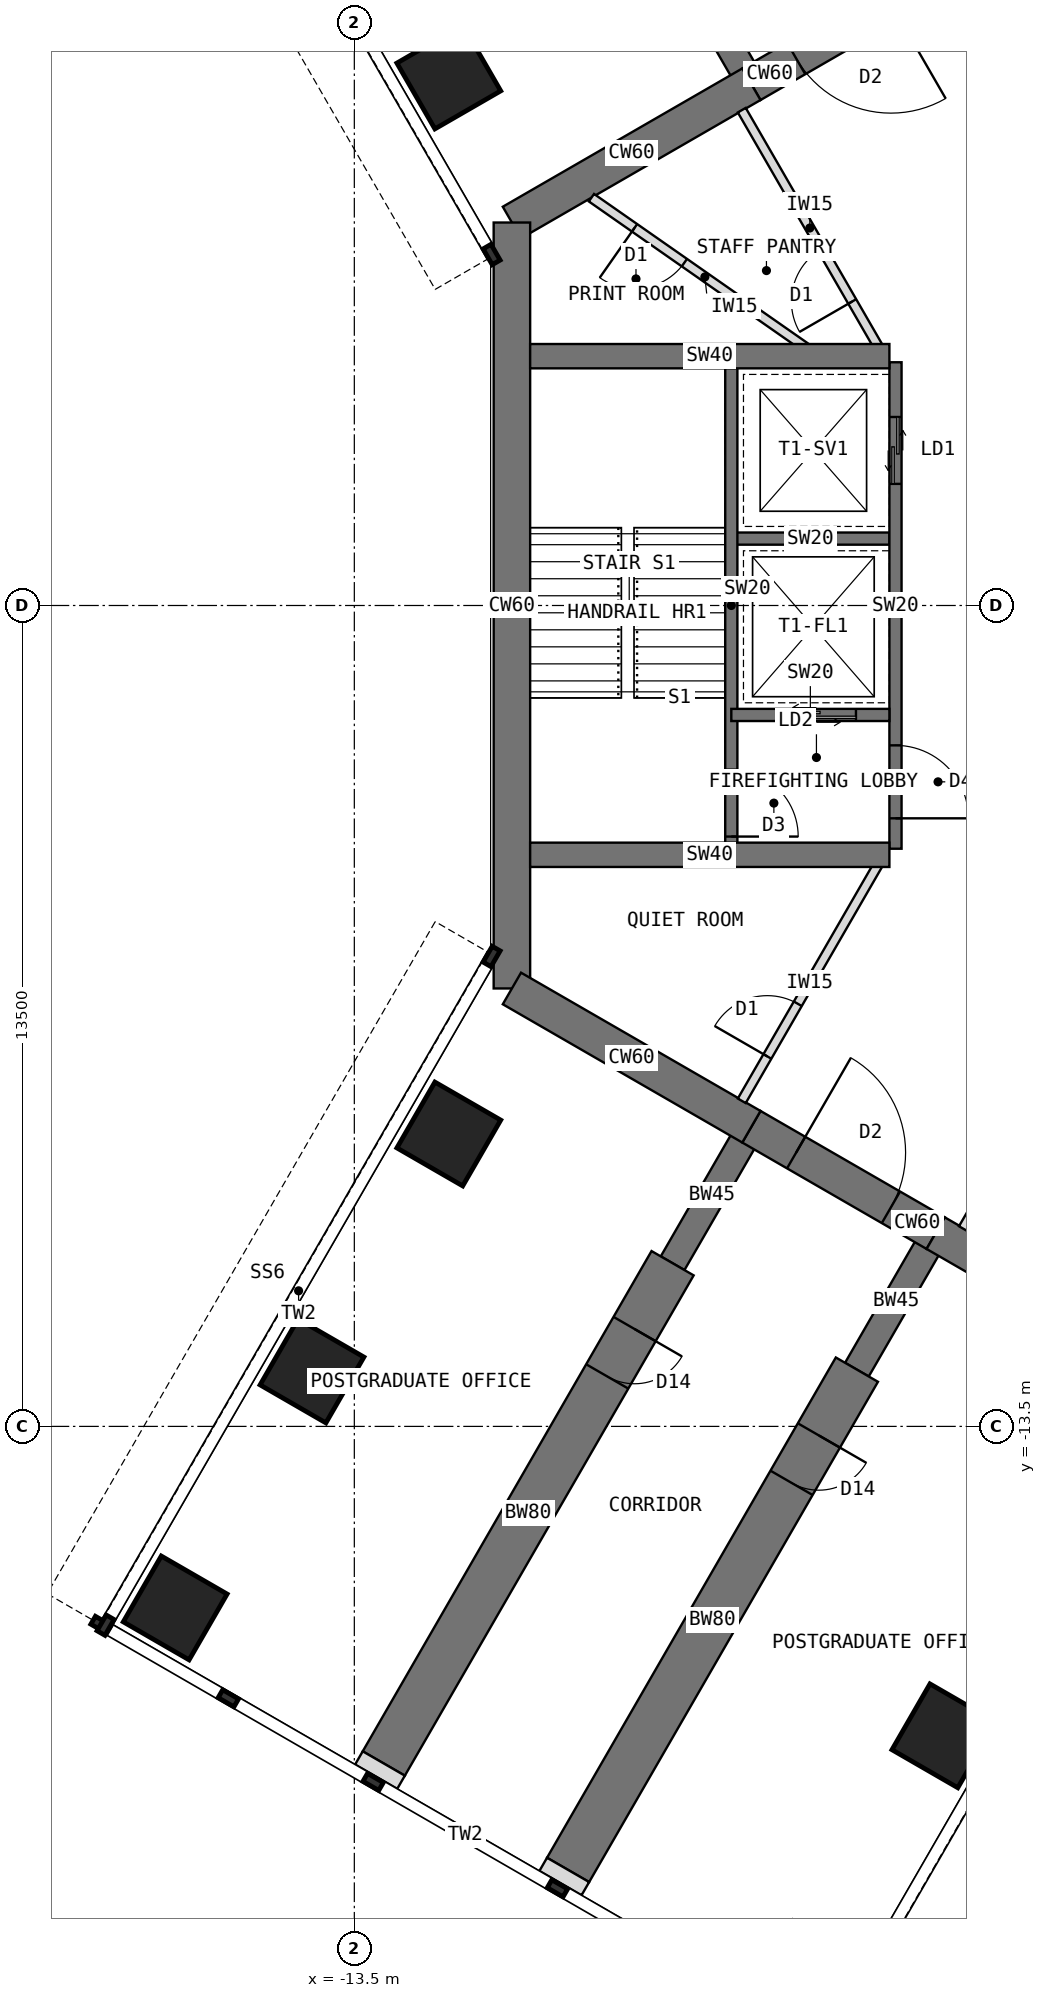
"""IFC4 building model, lengths in metres.
Left out: names, types, materials, properties, quantities, classifications, styles, units other than length and angle.
Written with IfcOpenShell. Run it as: python <this file> out.ifc"""

import sys

from ifc_helpers import new_model, si_unit, direction, frame, frame_2d, origin, origin_2d, place, context, subcontext, project, spatial, rectangle, extrude, element, fill, save


model = new_model("IFC4")
c1 = context("Model", 3, precision=1e-05, world=origin(), true_north=direction((0.0, 1.0)))
c2 = subcontext(c1, "Body", "Model", "MODEL_VIEW")
j1 = project(units=[si_unit("LENGTHUNIT", "METRE"), si_unit("PLANEANGLEUNIT", "RADIAN")], contexts=[c1])
p1 = place(None, origin())
s1 = spatial("IfcSite", under=j1, at=p1, CompositionType="ELEMENT")
p2 = place(p1, origin())
s2 = spatial("IfcBuilding", under=s1, at=p2, CompositionType="ELEMENT")
p3 = place(p2, frame((0.0, 0.0, 157.5)))
s3 = spatial("IfcBuildingStorey", under=s2, at=p3, CompositionType="ELEMENT", Elevation=157.5)
p4 = place(p3, frame((-3.939, 10.322, 0.0), z_axis=(0.0, 0.0, 1.0), x_axis=(-0.866019471182, -0.500010275428, 0.0)))
e1 = element("IfcWall", 1, at=p4, inside=s3, PredefinedType="SHEAR", context=c2, shape_type="SweptSolid", body=[
    extrude(rectangle(XDim=3.5, YDim=0.6, at=frame_2d((1.75, 0.0))), origin(), (0.0, 0.0, 1.0), 4.0),
])
p5 = place(p4, frame((0.85, 0.0, 0.0)))
e2 = element("IfcOpeningElement", 2, at=p5, cuts=e1, PredefinedType="OPENING", context=c2, shape_type="SweptSolid", body=[
    extrude(rectangle(XDim=1.8, YDim=2.1, at=frame_2d((0.9, 1.05))), frame((0.0, 0.31, 0.0), z_axis=(0.0, -1.0, 0.0), x_axis=(1.0, 0.0, 0.0)), (0.0, 0.0, 1.0), 0.62),
])
p6 = place(p3, frame((-6.97, 8.572, 0.0), z_axis=(0.0, 0.0, 1.0), x_axis=(-0.866034513004, -0.499984222037, 0.0)))
e3 = element("IfcWall", 3, at=p6, inside=s3, PredefinedType="SHEAR", context=c2, shape_type="SweptSolid", body=[
    extrude(rectangle(XDim=4.548, YDim=0.6, at=frame_2d((2.274, 0.0))), origin(), (0.0, 0.0, 1.0), 4.0),
])
p7 = place(p3, frame((-10.908, 6.298, 0.0), z_axis=(0.0, 0.0, 1.0), x_axis=(0.0, -1.0, 0.0)))
e4 = element("IfcWall", 4, at=p7, inside=s3, PredefinedType="SHEAR", context=c2, shape_type="SweptSolid", body=[
    extrude(rectangle(XDim=12.596, YDim=0.6, at=frame_2d((6.298, 0.0))), origin(), (0.0, 0.0, 1.0), 4.0),
])
p8 = place(p3, frame((-10.908, -6.298, 0.0), z_axis=(0.0, 0.0, 1.0), x_axis=(0.866034513004, -0.499984222037, 0.0)))
e5 = element("IfcWall", 5, at=p8, inside=s3, PredefinedType="SHEAR", context=c2, shape_type="SweptSolid", body=[
    extrude(rectangle(XDim=4.548, YDim=0.6, at=frame_2d((2.274, 0.0))), origin(), (0.0, 0.0, 1.0), 4.0),
])
p9 = place(p3, frame((-6.97, -8.572, 0.0), z_axis=(0.0, 0.0, 1.0), x_axis=(0.866019471182, -0.500010275428, 0.0)))
e6 = element("IfcWall", 6, at=p9, inside=s3, PredefinedType="SHEAR", context=c2, shape_type="SweptSolid", body=[
    extrude(rectangle(XDim=3.5, YDim=0.6, at=frame_2d((1.75, 0.0))), origin(), (0.0, 0.0, 1.0), 4.0),
])
p10 = place(p9, frame((0.85, 0.0, 0.0)))
e7 = element("IfcOpeningElement", 7, at=p10, cuts=e6, PredefinedType="OPENING", context=c2, shape_type="SweptSolid", body=[
    extrude(rectangle(XDim=1.8, YDim=2.1, at=frame_2d((0.9, 1.05))), frame((0.0, 0.31, 0.0), z_axis=(0.0, -1.0, 0.0), x_axis=(1.0, 0.0, 0.0)), (0.0, 0.0, 1.0), 0.62),
])
p11 = place(p3, frame((-3.939, -10.322, 0.0), z_axis=(0.0, 0.0, 1.0), x_axis=(0.866011268655, -0.500024481964, 0.0)))
e8 = element("IfcWall", 8, at=p11, inside=s3, PredefinedType="SHEAR", context=c2, shape_type="SweptSolid", body=[
    extrude(rectangle(XDim=4.548, YDim=0.6, at=frame_2d((2.274, 0.0))), origin(), (0.0, 0.0, 1.0), 4.0),
])
for number, where, z_axis, x_axis in (
    (9, (-6.97, 8.572, 0.0), (0.0, 0.0, 1.0), (-0.5, 0.866, 0.0)),
    (10, (-3.939, -10.322, 0.0), (0.0, 0.0, 1.0), (-0.5, -0.866, 0.0)),
):
    element("IfcWall", number, at=place(p3, frame(where, z_axis=z_axis, x_axis=x_axis)), inside=s3, PredefinedType="SHEAR", context=c2, shape_type="SweptSolid", body=[
        extrude(rectangle(XDim=2.592, YDim=0.45, at=frame_2d((1.296, 0.0))), origin(), (0.0, 0.0, 1.0), 4.0),
    ])
p12 = place(p3, frame((-5.234, -12.566, 0.0), z_axis=(0.0, 0.0, 1.0), x_axis=(-0.499997557548, -0.86602681393, 0.0)))
e11 = element("IfcWall", 11, at=p12, inside=s3, PredefinedType="SHEAR", context=c2, shape_type="SweptSolid", body=[
    extrude(rectangle(XDim=9.5, YDim=0.8, at=frame_2d((4.75, 0.0))), origin(), (0.0, 0.0, 1.0), 4.0),
])
p13 = place(p12, frame((1.25, 0.0, 0.0)))
e12 = element("IfcOpeningElement", 12, at=p13, cuts=e11, PredefinedType="OPENING", context=c2, shape_type="SweptSolid", body=[
    extrude(rectangle(XDim=0.9, YDim=2.1, at=frame_2d((0.45, 1.05))), frame((0.0, 0.41, 0.0), z_axis=(0.0, -1.0, 0.0), x_axis=(1.0, 0.0, 0.0)), (0.0, 0.0, 1.0), 0.82),
])
p14 = place(p3, frame((-6.97, -8.572, 0.0), z_axis=(0.0, 0.0, 1.0), x_axis=(-0.499988811324, -0.866031863473, 0.0)))
e13 = element("IfcWall", 13, at=p14, inside=s3, PredefinedType="SHEAR", context=c2, shape_type="SweptSolid", body=[
    extrude(rectangle(XDim=2.592, YDim=0.45, at=frame_2d((1.296, 0.0))), origin(), (0.0, 0.0, 1.0), 4.0),
])
p15 = place(p3, frame((-8.266, -10.816, 0.0), z_axis=(0.0, 0.0, 1.0), x_axis=(-0.499997557548, -0.86602681393, 0.0)))
e14 = element("IfcWall", 14, at=p15, inside=s3, PredefinedType="SHEAR", context=c2, shape_type="SweptSolid", body=[
    extrude(rectangle(XDim=9.5, YDim=0.8, at=frame_2d((4.75, 0.0))), origin(), (0.0, 0.0, 1.0), 4.0),
])
p16 = place(p15, frame((1.25, 0.0, 0.0)))
e15 = element("IfcOpeningElement", 15, at=p16, cuts=e14, PredefinedType="OPENING", context=c2, shape_type="SweptSolid", body=[
    extrude(rectangle(XDim=0.9, YDim=2.1, at=frame_2d((0.45, 1.05))), frame((0.0, 0.41, 0.0), z_axis=(0.0, -1.0, 0.0), x_axis=(1.0, 0.0, 0.0)), (0.0, 0.0, 1.0), 0.82),
])
for number, where, z_axis, x_axis in (
    (16, (-11.946, 8.691, 0.0), (0.0, 0.0, 1.0), (0.866, 0.5, 0.0)),
    (17, (-11.946, -8.691, 0.0), (0.0, 0.0, 1.0), (0.5, 0.866, 0.0)),
    (18, (-3.804, -18.588, 0.0), (0.0, 0.0, 1.0), (0.5, 0.866, 0.0)),
    (19, (-14.196, -12.588, 0.0), (0.0, 0.0, 1.0), (0.5, 0.866, 0.0)),
    (20, (-16.446, -16.486, 0.0), (0.0, 0.0, 1.0), (0.5, 0.866, 0.0)),
):
    element("IfcColumn", number, at=place(p3, frame(where, z_axis=z_axis, x_axis=x_axis)), inside=s3, PredefinedType="COLUMN", context=c2, shape_type="SweptSolid", body=[
        extrude(rectangle(XDim=1.25, YDim=1.25, at=origin_2d()), origin(), (0.0, 0.0, 1.0), 4.0),
    ])
for number, where, z_axis, x_axis in (
    (21, (-9.984, -20.794, 0.0), (0.0, 0.0, 1.0), (-0.5, -0.866, 0.0)),
    (22, (-13.016, -19.044, 0.0), (0.0, 0.0, 1.0), (-0.5, -0.866, 0.0)),
):
    element("IfcWall", number, at=place(p3, frame(where, z_axis=z_axis, x_axis=x_axis)), inside=s3, PredefinedType="PARTITIONING", context=c2, shape_type="SweptSolid", body=[
        extrude(rectangle(XDim=0.25, YDim=0.8, at=frame_2d((0.125, 0.0))), origin(), (0.0, 0.0, 1.0), 3.8),
    ])
p17 = place(p3, frame((-4.6, 4.0, 0.0), z_axis=(0.0, 0.0, 1.0), x_axis=(0.0, -1.0, 0.0)))
e23 = element("IfcWall", 23, at=p17, inside=s3, PredefinedType="SHEAR", context=c2, shape_type="SweptSolid", body=[
    extrude(rectangle(XDim=8.0, YDim=0.2, at=frame_2d((4.0, 0.0))), origin(), (0.0, 0.0, 1.0), 4.0),
])
p18 = place(p17, frame((6.3, 0.0, 0.0)))
e24 = element("IfcOpeningElement", 24, at=p18, cuts=e23, PredefinedType="OPENING", context=c2, shape_type="SweptSolid", body=[
    extrude(rectangle(XDim=1.2, YDim=2.1, at=frame_2d((0.6, 1.05))), frame((0.0, 0.11, 0.0), z_axis=(0.0, -1.0, 0.0), x_axis=(1.0, 0.0, 0.0)), (0.0, 0.0, 1.0), 0.22),
])
p19 = place(p17, frame((0.9, 0.0, 0.0)))
e25 = element("IfcOpeningElement", 25, at=p19, cuts=e23, PredefinedType="OPENING", context=c2, shape_type="SweptSolid", body=[
    extrude(rectangle(XDim=1.1, YDim=2.2, at=frame_2d((0.55, 1.1))), frame((0.0, 0.11, 0.0), z_axis=(0.0, -1.0, 0.0), x_axis=(1.0, 0.0, 0.0)), (0.0, 0.0, 1.0), 0.22),
])
p20 = place(p3, frame((-4.7, 1.1, 0.0), z_axis=(0.0, 0.0, 1.0), x_axis=(-1.0, 0.0, 0.0)))
e26 = element("IfcWall", 26, at=p20, inside=s3, PredefinedType="SHEAR", context=c2, shape_type="SweptSolid", body=[
    extrude(rectangle(XDim=2.6, YDim=0.2, at=frame_2d((1.3, 0.0))), origin(), (0.0, 0.0, 1.0), 4.0),
])
p21 = place(p3, frame((-4.7, -1.8, 0.0), z_axis=(0.0, 0.0, 1.0), x_axis=(-1.0, 0.0, 0.0)))
e27 = element("IfcWall", 27, at=p21, inside=s3, PredefinedType="SHEAR", context=c2, shape_type="SweptSolid", body=[
    extrude(rectangle(XDim=2.6, YDim=0.2, at=frame_2d((1.3, 0.0))), origin(), (0.0, 0.0, 1.0), 4.0),
])
p22 = place(p21, frame((0.55, 0.0, 0.0)))
e28 = element("IfcOpeningElement", 28, at=p22, cuts=e27, PredefinedType="OPENING", context=c2, shape_type="SweptSolid", body=[
    extrude(rectangle(XDim=1.3, YDim=2.2, at=frame_2d((0.65, 1.1))), frame((0.0, 0.11, 0.0), z_axis=(0.0, -1.0, 0.0), x_axis=(1.0, 0.0, 0.0)), (0.0, 0.0, 1.0), 0.22),
])
p23 = place(p3, frame((-7.3, 4.0, 0.0), z_axis=(0.0, 0.0, 1.0), x_axis=(0.0, -1.0, 0.0)))
e29 = element("IfcWall", 29, at=p23, inside=s3, PredefinedType="SHEAR", context=c2, shape_type="SweptSolid", body=[
    extrude(rectangle(XDim=8.0, YDim=0.2, at=frame_2d((4.0, 0.0))), origin(), (0.0, 0.0, 1.0), 4.0),
])
p24 = place(p23, frame((6.7, 0.0, 0.0)))
e30 = element("IfcOpeningElement", 30, at=p24, cuts=e29, PredefinedType="OPENING", context=c2, shape_type="SweptSolid", body=[
    extrude(rectangle(XDim=1.1, YDim=2.1, at=frame_2d((0.55, 1.05))), frame((0.0, 0.11, 0.0), z_axis=(0.0, -1.0, 0.0), x_axis=(1.0, 0.0, 0.0)), (0.0, 0.0, 1.0), 0.22),
])
for number, where, z_axis, x_axis in (
    (31, (-4.7, -4.1, 0.0), (0.0, 0.0, 1.0), (-1.0, 0.0, 0.0)),
    (32, (-4.7, 4.1, 0.0), (0.0, 0.0, 1.0), (-1.0, 0.0, 0.0)),
):
    element("IfcWall", number, at=place(p3, frame(where, z_axis=z_axis, x_axis=x_axis)), inside=s3, PredefinedType="SHEAR", context=c2, shape_type="SweptSolid", body=[
        extrude(rectangle(XDim=5.908, YDim=0.4, at=frame_2d((2.954, 0.0))), origin(), (0.0, 0.0, 1.0), 4.0),
    ])
p25 = place(p3, frame((-1.253, -6.37, 0.0), z_axis=(0.0, 0.0, 1.0), x_axis=(-0.499999473313, -0.866025707867, 0.0)))
e33 = element("IfcWall", 33, at=p25, inside=s3, PredefinedType="PARTITIONING", context=c2, shape_type="SweptSolid", body=[
    extrude(rectangle(XDim=4.476, YDim=0.15, at=frame_2d((2.238, 0.0))), origin(), (0.0, 0.0, 1.0), 3.8),
])
p26 = place(p25, frame((2.633, 0.0, 0.0)))
e34 = element("IfcOpeningElement", 34, at=p26, cuts=e33, PredefinedType="OPENING", context=c2, shape_type="SweptSolid", body=[
    extrude(rectangle(XDim=1.0, YDim=2.1, at=frame_2d((0.5, 1.05))), frame((0.0, 0.085, 0.0), z_axis=(0.0, -1.0, 0.0), x_axis=(1.0, 0.0, 0.0)), (0.0, 0.0, 1.0), 0.17),
])
p27 = place(p3, frame((-7.128, -8.146, 0.0), z_axis=(0.0, 0.0, 1.0), x_axis=(0.499999473313, 0.866025707867, 0.0)))
e35 = element("IfcWall", 35, at=p27, inside=s3, PredefinedType="PARTITIONING", context=c2, shape_type="SweptSolid", body=[
    extrude(rectangle(XDim=4.476, YDim=0.15, at=frame_2d((2.238, 0.0))), origin(), (0.0, 0.0, 1.0), 3.8),
])
p28 = place(p27, frame((0.843, 0.0, 0.0)))
e36 = element("IfcOpeningElement", 36, at=p28, cuts=e35, PredefinedType="OPENING", context=c2, shape_type="SweptSolid", body=[
    extrude(rectangle(XDim=1.0, YDim=2.1, at=frame_2d((0.5, 1.05))), frame((0.0, 0.085, 0.0), z_axis=(0.0, -1.0, 0.0), x_axis=(1.0, 0.0, 0.0)), (0.0, 0.0, 1.0), 0.17),
])
p29 = place(p3, frame((-4.89, 4.27, 0.0), z_axis=(0.0, 0.0, 1.0), x_axis=(-0.499999473313, 0.866025707867, 0.0)))
e37 = element("IfcWall", 37, at=p29, inside=s3, PredefinedType="PARTITIONING", context=c2, shape_type="SweptSolid", body=[
    extrude(rectangle(XDim=4.476, YDim=0.15, at=frame_2d((2.238, 0.0))), origin(), (0.0, 0.0, 1.0), 3.8),
])
p30 = place(p29, frame((0.843, 0.0, 0.0)))
e38 = element("IfcOpeningElement", 38, at=p30, cuts=e37, PredefinedType="OPENING", context=c2, shape_type="SweptSolid", body=[
    extrude(rectangle(XDim=1.0, YDim=2.1, at=frame_2d((0.5, 1.05))), frame((0.0, 0.085, 0.0), z_axis=(0.0, -1.0, 0.0), x_axis=(1.0, 0.0, 0.0)), (0.0, 0.0, 1.0), 0.17),
])
p31 = place(p3, frame((-3.49, 10.246, 0.0), z_axis=(0.0, 0.0, 1.0), x_axis=(0.499999473313, -0.866025707867, 0.0)))
e39 = element("IfcWall", 39, at=p31, inside=s3, PredefinedType="PARTITIONING", context=c2, shape_type="SweptSolid", body=[
    extrude(rectangle(XDim=4.476, YDim=0.15, at=frame_2d((2.238, 0.0))), origin(), (0.0, 0.0, 1.0), 3.8),
])
p32 = place(p31, frame((0.843, 0.0, 0.0)))
e40 = element("IfcOpeningElement", 40, at=p32, cuts=e39, PredefinedType="OPENING", context=c2, shape_type="SweptSolid", body=[
    extrude(rectangle(XDim=1.0, YDim=2.1, at=frame_2d((0.5, 1.05))), frame((0.0, 0.085, 0.0), z_axis=(0.0, -1.0, 0.0), x_axis=(1.0, 0.0, 0.0)), (0.0, 0.0, 1.0), 0.17),
])
p33 = place(p3, frame((-5.869, 4.1, 0.0), z_axis=(0.0, 0.0, 1.0), x_axis=(-0.819788459852, 0.572666465836, 0.0)))
e41 = element("IfcWall", 41, at=p33, inside=s3, PredefinedType="PARTITIONING", context=c2, shape_type="SweptSolid", body=[
    extrude(rectangle(XDim=4.552, YDim=0.15, at=frame_2d((2.276, 0.0))), origin(), (0.0, 0.0, 1.0), 3.8),
])
p34 = place(p33, frame((2.686, 0.0, 0.0)))
e42 = element("IfcOpeningElement", 42, at=p34, cuts=e41, PredefinedType="OPENING", context=c2, shape_type="SweptSolid", body=[
    extrude(rectangle(XDim=1.0, YDim=2.1, at=frame_2d((0.5, 1.05))), frame((0.0, 0.085, 0.0), z_axis=(0.0, -1.0, 0.0), x_axis=(1.0, 0.0, 0.0)), (0.0, 0.0, 1.0), 0.17),
])
p35 = place(p18, origin())
e43 = element("IfcDoor", 43, at=p35, inside=s3, OperationType="SINGLE_SWING_RIGHT", PredefinedType="DOOR", context=c2, shape_type="SweptSolid", body=[
    extrude(rectangle(XDim=1.2, YDim=2.1, at=frame_2d((0.6, 1.05))), frame((0.0, 0.025, 0.0), z_axis=(0.0, -1.0, 0.0), x_axis=(1.0, 0.0, 0.0)), (0.0, 0.0, 1.0), 0.05),
])
fill(e24, e43)
p36 = place(p22, origin())
e44 = element("IfcDoor", 44, at=p36, inside=s3, OperationType="DOUBLE_DOOR_SLIDING", PredefinedType="DOOR", context=c2, shape_type="SweptSolid", body=[
    extrude(rectangle(XDim=1.3, YDim=2.2, at=frame_2d((0.65, 1.1))), frame((0.0, 0.025, 0.0), z_axis=(0.0, -1.0, 0.0), x_axis=(1.0, 0.0, 0.0)), (0.0, 0.0, 1.0), 0.05),
])
fill(e28, e44)
p37 = place(p19, origin())
e45 = element("IfcDoor", 45, at=p37, inside=s3, OperationType="DOUBLE_DOOR_SLIDING", PredefinedType="DOOR", context=c2, shape_type="SweptSolid", body=[
    extrude(rectangle(XDim=1.1, YDim=2.2, at=frame_2d((0.55, 1.1))), frame((0.0, 0.025, 0.0), z_axis=(0.0, -1.0, 0.0), x_axis=(1.0, 0.0, 0.0)), (0.0, 0.0, 1.0), 0.05),
])
fill(e25, e45)
p38 = place(p24, origin())
e46 = element("IfcDoor", 46, at=p38, inside=s3, OperationType="SINGLE_SWING_RIGHT", PredefinedType="DOOR", context=c2, shape_type="SweptSolid", body=[
    extrude(rectangle(XDim=1.1, YDim=2.1, at=frame_2d((0.55, 1.05))), frame((0.0, 0.025, 0.0), z_axis=(0.0, -1.0, 0.0), x_axis=(1.0, 0.0, 0.0)), (0.0, 0.0, 1.0), 0.05),
])
fill(e30, e46)
p39 = place(p5, origin())
e47 = element("IfcDoor", 47, at=p39, inside=s3, OperationType="DOUBLE_DOOR_DOUBLE_SWING", PredefinedType="DOOR", context=c2, shape_type="SweptSolid", body=[
    extrude(rectangle(XDim=1.72, YDim=2.06, at=frame_2d((0.9, 1.03))), frame((0.0, 0.025, 0.0), z_axis=(0.0, -1.0, 0.0), x_axis=(1.0, 0.0, 0.0)), (0.0, 0.0, 1.0), 0.05),
    extrude(rectangle(XDim=0.04, YDim=2.1, at=frame_2d((0.02, 1.05))), frame((0.0, 0.3, 0.0), z_axis=(0.0, -1.0, 0.0), x_axis=(1.0, 0.0, 0.0)), (0.0, 0.0, 1.0), 0.6),
    extrude(rectangle(XDim=0.04, YDim=2.1, at=frame_2d((1.78, 1.05))), frame((0.0, 0.3, 0.0), z_axis=(0.0, -1.0, 0.0), x_axis=(1.0, 0.0, 0.0)), (0.0, 0.0, 1.0), 0.6),
    extrude(rectangle(XDim=1.72, YDim=0.04, at=frame_2d((0.9, 2.08))), frame((0.0, 0.3, 0.0), z_axis=(0.0, -1.0, 0.0), x_axis=(1.0, 0.0, 0.0)), (0.0, 0.0, 1.0), 0.6),
])
fill(e2, e47)
p40 = place(p10, origin())
e48 = element("IfcDoor", 48, at=p40, inside=s3, OperationType="DOUBLE_DOOR_DOUBLE_SWING", PredefinedType="DOOR", context=c2, shape_type="SweptSolid", body=[
    extrude(rectangle(XDim=1.72, YDim=2.06, at=frame_2d((0.9, 1.03))), frame((0.0, 0.025, 0.0), z_axis=(0.0, -1.0, 0.0), x_axis=(1.0, 0.0, 0.0)), (0.0, 0.0, 1.0), 0.05),
    extrude(rectangle(XDim=0.04, YDim=2.1, at=frame_2d((0.02, 1.05))), frame((0.0, 0.3, 0.0), z_axis=(0.0, -1.0, 0.0), x_axis=(1.0, 0.0, 0.0)), (0.0, 0.0, 1.0), 0.6),
    extrude(rectangle(XDim=0.04, YDim=2.1, at=frame_2d((1.78, 1.05))), frame((0.0, 0.3, 0.0), z_axis=(0.0, -1.0, 0.0), x_axis=(1.0, 0.0, 0.0)), (0.0, 0.0, 1.0), 0.6),
    extrude(rectangle(XDim=1.72, YDim=0.04, at=frame_2d((0.9, 2.08))), frame((0.0, 0.3, 0.0), z_axis=(0.0, -1.0, 0.0), x_axis=(1.0, 0.0, 0.0)), (0.0, 0.0, 1.0), 0.6),
])
fill(e7, e48)
p41 = place(p28, origin())
e49 = element("IfcDoor", 49, at=p41, inside=s3, OperationType="SINGLE_SWING_LEFT", PredefinedType="DOOR", context=c2, shape_type="SweptSolid", body=[
    extrude(rectangle(XDim=1.0, YDim=2.1, at=frame_2d((0.5, 1.05))), frame((0.0, 0.025, 0.0), z_axis=(0.0, -1.0, 0.0), x_axis=(1.0, 0.0, 0.0)), (0.0, 0.0, 1.0), 0.05),
])
fill(e36, e49)
p42 = place(p34, origin())
e50 = element("IfcDoor", 50, at=p42, inside=s3, OperationType="SINGLE_SWING_RIGHT", PredefinedType="DOOR", context=c2, shape_type="SweptSolid", body=[
    extrude(rectangle(XDim=1.0, YDim=2.1, at=frame_2d((0.5, 1.05))), frame((0.0, 0.025, 0.0), z_axis=(0.0, -1.0, 0.0), x_axis=(1.0, 0.0, 0.0)), (0.0, 0.0, 1.0), 0.05),
])
fill(e42, e50)
p43 = place(p30, origin())
e51 = element("IfcDoor", 51, at=p43, inside=s3, OperationType="SINGLE_SWING_LEFT", PredefinedType="DOOR", context=c2, shape_type="SweptSolid", body=[
    extrude(rectangle(XDim=1.0, YDim=2.1, at=frame_2d((0.5, 1.05))), frame((0.0, 0.025, 0.0), z_axis=(0.0, -1.0, 0.0), x_axis=(1.0, 0.0, 0.0)), (0.0, 0.0, 1.0), 0.05),
])
fill(e38, e51)
p44 = place(p13, origin())
e52 = element("IfcDoor", 52, at=p44, inside=s3, OperationType="SINGLE_SWING_LEFT", PredefinedType="DOOR", context=c2, shape_type="SweptSolid", body=[
    extrude(rectangle(XDim=0.82, YDim=2.06, at=frame_2d((0.45, 1.03))), frame((0.0, 0.025, 0.0), z_axis=(0.0, -1.0, 0.0), x_axis=(1.0, 0.0, 0.0)), (0.0, 0.0, 1.0), 0.05),
    extrude(rectangle(XDim=0.04, YDim=2.1, at=frame_2d((0.02, 1.05))), frame((0.0, 0.4, 0.0), z_axis=(0.0, -1.0, 0.0), x_axis=(1.0, 0.0, 0.0)), (0.0, 0.0, 1.0), 0.8),
    extrude(rectangle(XDim=0.04, YDim=2.1, at=frame_2d((0.88, 1.05))), frame((0.0, 0.4, 0.0), z_axis=(0.0, -1.0, 0.0), x_axis=(1.0, 0.0, 0.0)), (0.0, 0.0, 1.0), 0.8),
    extrude(rectangle(XDim=0.82, YDim=0.04, at=frame_2d((0.45, 2.08))), frame((0.0, 0.4, 0.0), z_axis=(0.0, -1.0, 0.0), x_axis=(1.0, 0.0, 0.0)), (0.0, 0.0, 1.0), 0.8),
])
fill(e12, e52)
p45 = place(p16, origin())
e53 = element("IfcDoor", 53, at=p45, inside=s3, OperationType="SINGLE_SWING_LEFT", PredefinedType="DOOR", context=c2, shape_type="SweptSolid", body=[
    extrude(rectangle(XDim=0.82, YDim=2.06, at=frame_2d((0.45, 1.03))), frame((0.0, 0.025, 0.0), z_axis=(0.0, -1.0, 0.0), x_axis=(1.0, 0.0, 0.0)), (0.0, 0.0, 1.0), 0.05),
    extrude(rectangle(XDim=0.04, YDim=2.1, at=frame_2d((0.02, 1.05))), frame((0.0, 0.4, 0.0), z_axis=(0.0, -1.0, 0.0), x_axis=(1.0, 0.0, 0.0)), (0.0, 0.0, 1.0), 0.8),
    extrude(rectangle(XDim=0.04, YDim=2.1, at=frame_2d((0.88, 1.05))), frame((0.0, 0.4, 0.0), z_axis=(0.0, -1.0, 0.0), x_axis=(1.0, 0.0, 0.0)), (0.0, 0.0, 1.0), 0.8),
    extrude(rectangle(XDim=0.82, YDim=0.04, at=frame_2d((0.45, 2.08))), frame((0.0, 0.4, 0.0), z_axis=(0.0, -1.0, 0.0), x_axis=(1.0, 0.0, 0.0)), (0.0, 0.0, 1.0), 0.8),
])
fill(e15, e53)
save(model, sys.argv[1])
